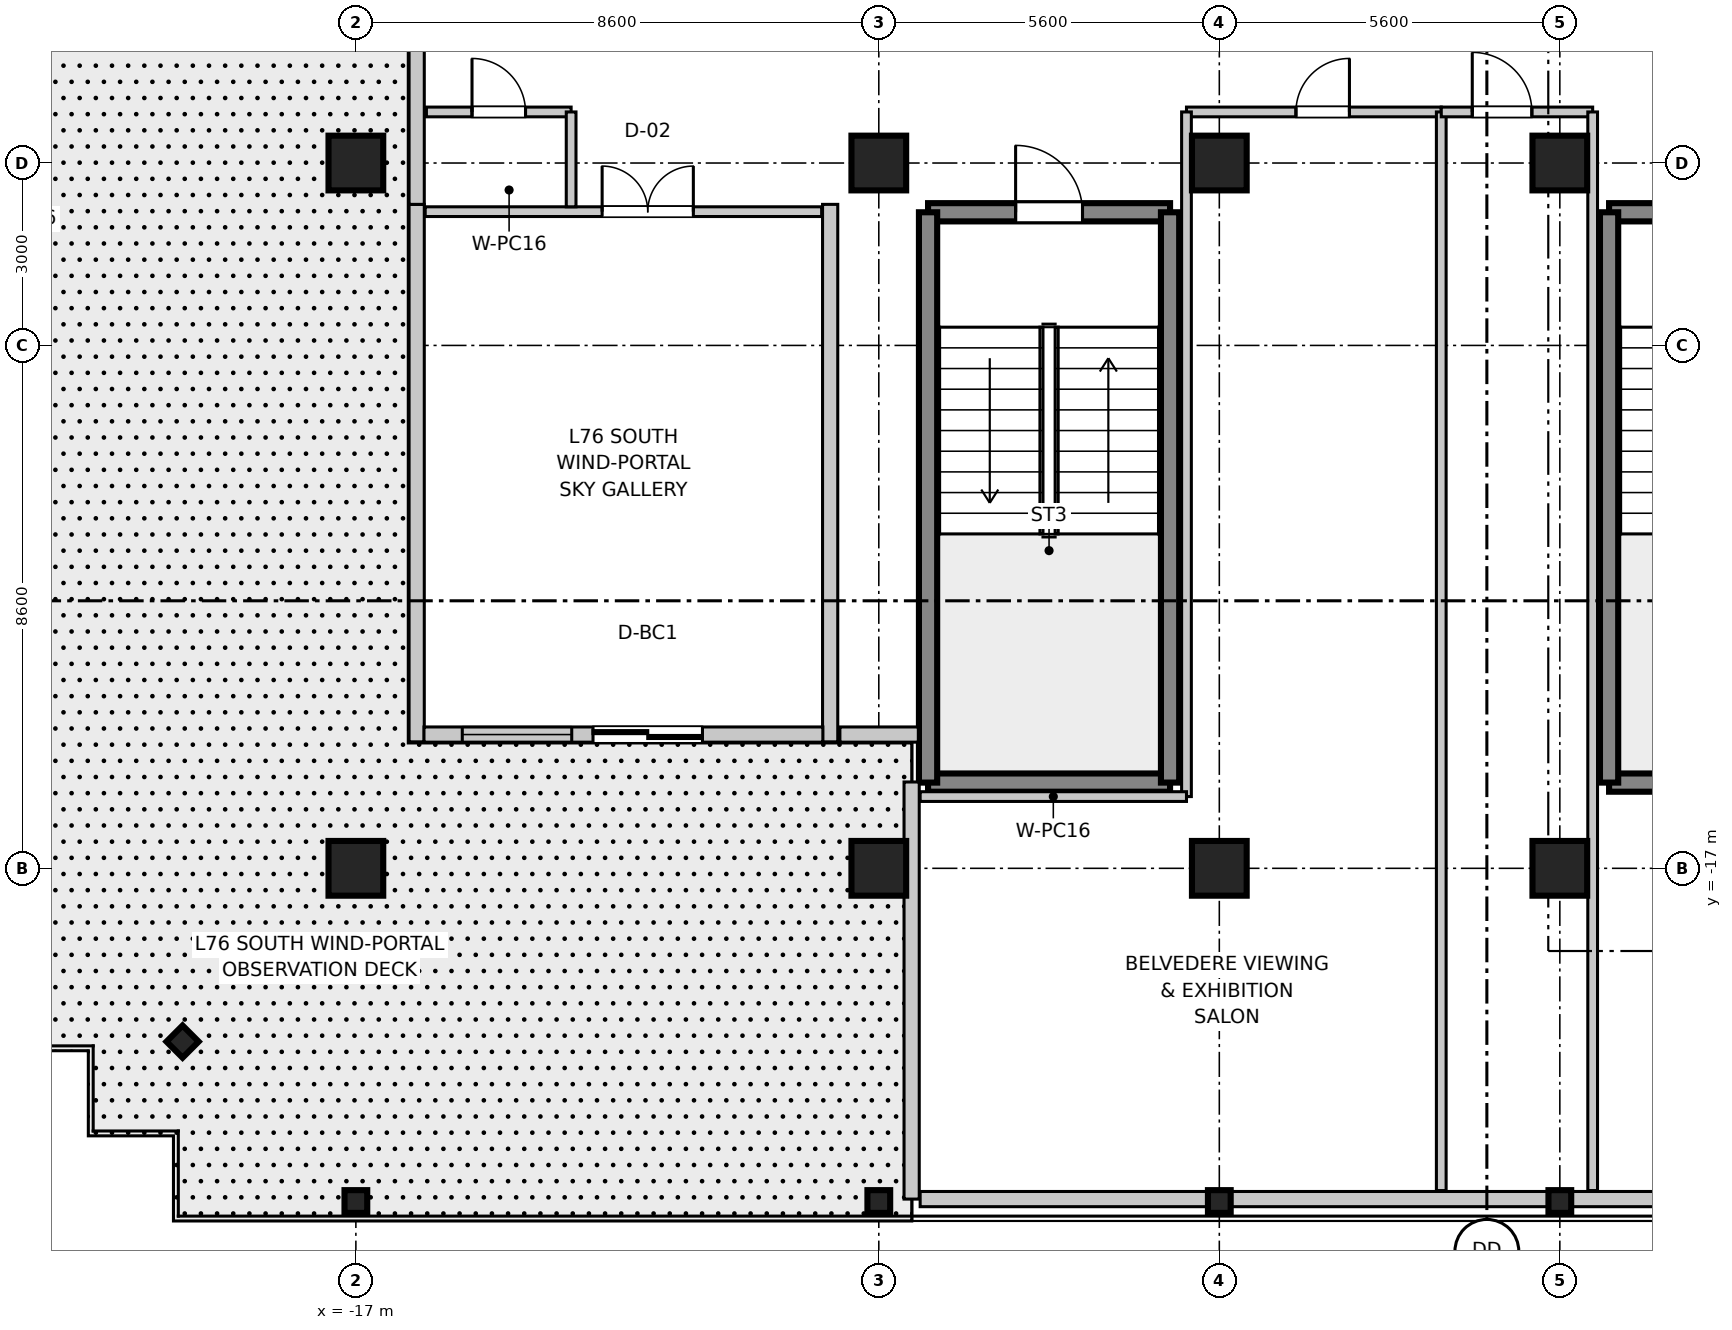
"""IFC4 building model, lengths in metres.
Left out: names, types, materials, properties, quantities, classifications, styles, units other than length and angle.
Written with IfcOpenShell. Run it as: python <this file> out.ifc"""

import sys

from ifc_helpers import new_model, si_unit, direction, frame, frame_2d, origin, origin_2d, place, context, subcontext, project, spatial, rectangle, i_section, extrude, source, transform, mapped, element, fill, save


model = new_model("IFC4")
c1 = context("Model", 3, precision=1e-05, world=origin(), true_north=direction((0.0, 1.0)))
c2 = subcontext(c1, "Body", "Model", "MODEL_VIEW")
j1 = project(units=[si_unit("LENGTHUNIT", "METRE"), si_unit("PLANEANGLEUNIT", "RADIAN")], contexts=[c1])
p1 = place(None, origin())
s1 = spatial("IfcSite", under=j1, at=p1, CompositionType="ELEMENT")
p2 = place(p1, origin())
s2 = spatial("IfcBuilding", under=s1, at=p2, CompositionType="ELEMENT")
p3 = place(p2, frame((0.0, 0.0, 296.5)))
s3 = spatial("IfcBuildingStorey", under=s2, at=p3, CompositionType="ELEMENT", Elevation=296.5)
m1 = source(origin(), c2, "Body", "SweptSolid", [
    extrude(rectangle(XDim=0.9, YDim=0.9, at=origin_2d()), origin(), (0.0, 0.0, 1.0), 3.805),
])
for number, where, z_axis, x_axis in (
    (1, (-17.0, -17.0, 0.0), (0.0, 0.0, 1.0), (1.0, 0.0, 0.0)),
    (2, (-17.0, -5.4, 0.0), (0.0, 0.0, 1.0), (1.0, 0.0, 0.0)),
    (3, (-8.4, -17.0, 0.0), (0.0, 0.0, 1.0), (1.0, 0.0, 0.0)),
    (4, (-8.4, -5.4, 0.0), (0.0, 0.0, 1.0), (1.0, 0.0, 0.0)),
    (5, (-2.8, -17.0, 0.0), (0.0, 0.0, 1.0), (1.0, 0.0, 0.0)),
    (6, (-2.8, -5.4, 0.0), (0.0, 0.0, 1.0), (1.0, 0.0, 0.0)),
    (7, (2.8, -17.0, 0.0), (0.0, 0.0, 1.0), (1.0, 0.0, 0.0)),
    (8, (2.8, -5.4, 0.0), (0.0, 0.0, 1.0), (1.0, 0.0, 0.0)),
):
    element("IfcColumn", number, at=place(p3, frame(where, z_axis=z_axis, x_axis=x_axis)), inside=s3, PredefinedType="COLUMN", context=c2, shape_type="MappedRepresentation", body=[
        mapped(m1, transform((0.0, 0.0, 0.0), scale=1.0)),
    ])
m2 = source(origin(), c2, "Body", "SweptSolid", [
    extrude(i_section(OverallWidth=0.374, OverallDepth=0.374, WebThickness=0.014, FlangeThickness=0.023, at=origin_2d()), origin(), (0.0, 0.0, 1.0), 3.805),
])
for number, where, z_axis, x_axis in (
    (9, (-17.0, -22.48, 0.0), (0.0, 0.0, 1.0), (0.0, 1.0, 0.0)),
    (10, (-8.4, -22.48, 0.0), (0.0, 0.0, 1.0), (0.0, 1.0, 0.0)),
    (11, (-2.8, -22.48, 0.0), (0.0, 0.0, 1.0), (0.0, 1.0, 0.0)),
    (12, (2.8, -22.48, 0.0), (0.0, 0.0, 1.0), (0.0, 1.0, 0.0)),
    (13, (-19.85, -19.85, 0.0), (0.0, 0.0, 1.0), (0.707, 0.707, 0.0)),
):
    element("IfcColumn", number, at=place(p3, frame(where, z_axis=z_axis, x_axis=x_axis)), inside=s3, PredefinedType="COLUMN", context=c2, shape_type="MappedRepresentation", body=[
        mapped(m2, transform((0.0, 0.0, 0.0), scale=1.0)),
    ])
m3 = source(origin(), c2, "Body", "SweptSolid", [
    extrude(rectangle(XDim=3.98, YDim=0.3, at=frame_2d((1.99, 0.0))), origin(), (0.0, 0.0, 1.0), 3.55),
])
p4 = place(p3, frame((3.61, -15.59, 0.0), z_axis=(0.0, 0.0, 1.0), x_axis=(1.0, 0.0, 0.0)))
e14 = element("IfcWall", 14, at=p4, inside=s3, PredefinedType="SHEAR", context=c2, shape_type="MappedRepresentation", body=[
    mapped(m3, transform((0.0, 0.0, 0.0), scale=1.0)),
])
p5 = place(p3, frame((3.61, -6.21, 0.0), z_axis=(0.0, 0.0, 1.0), x_axis=(1.0, 0.0, 0.0)))
e15 = element("IfcWall", 15, at=p5, inside=s3, PredefinedType="SHEAR", context=c2, shape_type="MappedRepresentation", body=[
    mapped(m3, transform((0.0, 0.0, 0.0), scale=1.0)),
])
p6 = place(p5, frame((1.44, 0.0, 0.0)))
e16 = element("IfcOpeningElement", 16, at=p6, cuts=e15, PredefinedType="OPENING", context=c2, shape_type="SweptSolid", body=[
    extrude(rectangle(XDim=1.1, YDim=2.15, at=frame_2d((0.55, 1.075))), frame((0.0, 0.16, 0.0), z_axis=(0.0, -1.0, 0.0), x_axis=(1.0, 0.0, 0.0)), (0.0, 0.0, 1.0), 0.32),
])
m4 = source(origin(), c2, "Body", "SweptSolid", [
    extrude(rectangle(XDim=9.38, YDim=0.3, at=frame_2d((4.69, 0.0))), origin(), (0.0, 0.0, 1.0), 3.55),
])
p7 = place(p3, frame((3.61, -15.59, 0.0), z_axis=(0.0, 0.0, 1.0), x_axis=(0.0, 1.0, 0.0)))
e17 = element("IfcWall", 17, at=p7, inside=s3, PredefinedType="SHEAR", context=c2, shape_type="MappedRepresentation", body=[
    mapped(m4, transform((0.0, 0.0, 0.0), scale=1.0)),
])
p8 = place(p3, frame((-7.59, -15.59, 0.0), z_axis=(0.0, 0.0, 1.0), x_axis=(1.0, 0.0, 0.0)))
e18 = element("IfcWall", 18, at=p8, inside=s3, PredefinedType="SHEAR", context=c2, shape_type="MappedRepresentation", body=[
    mapped(m3, transform((0.0, 0.0, 0.0), scale=1.0)),
])
p9 = place(p3, frame((-7.59, -6.21, 0.0), z_axis=(0.0, 0.0, 1.0), x_axis=(1.0, 0.0, 0.0)))
e19 = element("IfcWall", 19, at=p9, inside=s3, PredefinedType="SHEAR", context=c2, shape_type="MappedRepresentation", body=[
    mapped(m3, transform((0.0, 0.0, 0.0), scale=1.0)),
])
p10 = place(p9, frame((1.44, 0.0, 0.0)))
e20 = element("IfcOpeningElement", 20, at=p10, cuts=e19, PredefinedType="OPENING", context=c2, shape_type="SweptSolid", body=[
    extrude(rectangle(XDim=1.1, YDim=2.15, at=frame_2d((0.55, 1.075))), frame((0.0, 0.16, 0.0), z_axis=(0.0, -1.0, 0.0), x_axis=(1.0, 0.0, 0.0)), (0.0, 0.0, 1.0), 0.32),
])
for number, where, z_axis, x_axis in (
    (21, (-7.59, -15.59, 0.0), (0.0, 0.0, 1.0), (0.0, 1.0, 0.0)),
    (22, (-3.61, -15.59, 0.0), (0.0, 0.0, 1.0), (0.0, 1.0, 0.0)),
):
    element("IfcWall", number, at=place(p3, frame(where, z_axis=z_axis, x_axis=x_axis)), inside=s3, PredefinedType="SHEAR", context=c2, shape_type="MappedRepresentation", body=[
        mapped(m4, transform((0.0, 0.0, 0.0), scale=1.0)),
    ])
m5 = source(origin(), c2, "Body", "SweptSolid", [
    extrude(rectangle(XDim=8.84, YDim=0.25, at=frame_2d((4.42, 0.0))), origin(), (0.0, 0.0, 1.0), 2.99),
])
for number, where, z_axis, x_axis in (
    (23, (-16.0, -14.92, 0.0), (0.0, 0.0, 1.0), (0.0, 1.0, 0.0)),
    (24, (-9.2, -14.92, 0.0), (0.0, 0.0, 1.0), (0.0, 1.0, 0.0)),
):
    element("IfcWall", number, at=place(p3, frame(where, z_axis=z_axis, x_axis=x_axis)), inside=s3, PredefinedType="STANDARD", context=c2, shape_type="MappedRepresentation", body=[
        mapped(m5, transform((0.0, 0.0, 0.0), scale=1.0)),
    ])
m6 = source(origin(), c2, "Body", "SweptSolid", [
    extrude(rectangle(XDim=6.56, YDim=0.25, at=frame_2d((3.28, 0.0))), origin(), (0.0, 0.0, 1.0), 2.99),
])
p11 = place(p3, frame((-15.88, -14.8, 0.0), z_axis=(0.0, 0.0, 1.0), x_axis=(1.0, 0.0, 0.0)))
e25 = element("IfcWall", 25, at=p11, inside=s3, PredefinedType="STANDARD", context=c2, shape_type="MappedRepresentation", body=[
    mapped(m6, transform((0.0, 0.0, 0.0), scale=1.0)),
])
p12 = place(p11, frame((2.78, 0.0, 0.0)))
e26 = element("IfcOpeningElement", 26, at=p12, cuts=e25, PredefinedType="OPENING", context=c2, shape_type="SweptSolid", body=[
    extrude(rectangle(XDim=1.8, YDim=2.25, at=frame_2d((0.9, 1.125))), frame((0.0, 0.135, 0.0), z_axis=(0.0, -1.0, 0.0), x_axis=(1.0, 0.0, 0.0)), (0.0, 0.0, 1.0), 0.27),
])
p13 = place(p11, frame((0.63, 0.0, 0.85)))
e27 = element("IfcOpeningElement", 27, at=p13, cuts=e25, PredefinedType="OPENING", context=c2, shape_type="SweptSolid", body=[
    extrude(rectangle(XDim=1.8, YDim=1.5, at=frame_2d((0.9, 0.75))), frame((0.0, 0.135, 0.0), z_axis=(0.0, -1.0, 0.0), x_axis=(1.0, 0.0, 0.0)), (0.0, 0.0, 1.0), 0.27),
])
m7 = source(origin(), c2, "Body", "SweptSolid", [
    extrude(rectangle(XDim=2.72, YDim=0.25, at=frame_2d((1.36, 0.0))), origin(), (0.0, 0.0, 1.0), 2.89),
])
p14 = place(p3, frame((-16.0, -6.08, 0.0), z_axis=(0.0, 0.0, 1.0), x_axis=(0.0, 1.0, 0.0)))
e28 = element("IfcWall", 28, at=p14, inside=s3, PredefinedType="STANDARD", context=c2, shape_type="MappedRepresentation", body=[
    mapped(m7, transform((0.0, 0.0, 0.0), scale=1.0)),
])
m8 = source(origin(), c2, "Body", "SweptSolid", [
    extrude(rectangle(XDim=1.29, YDim=0.25, at=frame_2d((0.645, 0.0))), origin(), (0.0, 0.0, 1.0), 2.89),
])
p15 = place(p3, frame((-9.04, -14.8, 0.0), z_axis=(0.0, 0.0, 1.0), x_axis=(1.0, 0.0, 0.0)))
e29 = element("IfcWall", 29, at=p15, inside=s3, PredefinedType="STANDARD", context=c2, shape_type="MappedRepresentation", body=[
    mapped(m8, transform((0.0, 0.0, 0.0), scale=1.0)),
])
m9 = source(origin(), c2, "Body", "SweptSolid", [
    extrude(rectangle(XDim=6.86, YDim=0.25, at=frame_2d((3.43, 0.0))), origin(), (0.0, 0.0, 1.0), 2.89),
])
p16 = place(p3, frame((-7.86, -22.44, 0.0), z_axis=(0.0, 0.0, 1.0), x_axis=(0.0, 1.0, 0.0)))
e30 = element("IfcWall", 30, at=p16, inside=s3, PredefinedType="STANDARD", context=c2, shape_type="MappedRepresentation", body=[
    mapped(m9, transform((0.0, 0.0, 0.0), scale=1.0)),
])
m10 = source(origin(), c2, "Body", "SweptSolid", [
    extrude(rectangle(XDim=27.34, YDim=0.25, at=frame_2d((13.67, 0.0))), origin(), (0.0, 0.0, 1.0), 2.89),
])
p17 = place(p3, frame((-7.72, -22.44, 0.0), z_axis=(0.0, 0.0, 1.0), x_axis=(1.0, 0.0, 0.0)))
e31 = element("IfcWall", 31, at=p17, inside=s3, PredefinedType="STANDARD", context=c2, shape_type="MappedRepresentation", body=[
    mapped(m10, transform((0.0, 0.0, 0.0), scale=1.0)),
])
m11 = source(origin(), c2, "Body", "SweptSolid", [
    extrude(rectangle(XDim=6.52, YDim=0.16, at=frame_2d((3.26, 0.0))), origin(), (0.0, 0.0, 1.0), 2.89),
])
p18 = place(p3, frame((-15.86, -6.2, 0.0), z_axis=(0.0, 0.0, 1.0), x_axis=(1.0, 0.0, 0.0)))
e32 = element("IfcWall", 32, at=p18, inside=s3, PredefinedType="PARTITIONING", context=c2, shape_type="MappedRepresentation", body=[
    mapped(m11, transform((0.0, 0.0, 0.0), scale=1.0)),
])
p19 = place(p18, frame((2.91, 0.0, 0.0)))
e33 = element("IfcOpeningElement", 33, at=p19, cuts=e32, PredefinedType="OPENING", context=c2, shape_type="SweptSolid", body=[
    extrude(rectangle(XDim=1.5, YDim=2.15, at=frame_2d((0.75, 1.075))), frame((0.0, 0.09, 0.0), z_axis=(0.0, -1.0, 0.0), x_axis=(1.0, 0.0, 0.0)), (0.0, 0.0, 1.0), 0.18),
])
m12 = source(origin(), c2, "Body", "SweptSolid", [
    extrude(rectangle(XDim=2.38, YDim=0.16, at=frame_2d((1.19, 0.0))), origin(), (0.0, 0.0, 1.0), 2.89),
])
p20 = place(p3, frame((-15.84, -4.56, 0.0), z_axis=(0.0, 0.0, 1.0), x_axis=(1.0, 0.0, 0.0)))
e34 = element("IfcWall", 34, at=p20, inside=s3, PredefinedType="PARTITIONING", context=c2, shape_type="MappedRepresentation", body=[
    mapped(m12, transform((0.0, 0.0, 0.0), scale=1.0)),
])
p21 = place(p20, frame((0.75, 0.0, 0.0)))
e35 = element("IfcOpeningElement", 35, at=p21, cuts=e34, PredefinedType="OPENING", context=c2, shape_type="SweptSolid", body=[
    extrude(rectangle(XDim=0.88, YDim=2.1, at=frame_2d((0.44, 1.05))), frame((0.0, 0.09, 0.0), z_axis=(0.0, -1.0, 0.0), x_axis=(1.0, 0.0, 0.0)), (0.0, 0.0, 1.0), 0.18),
])
m13 = source(origin(), c2, "Body", "SweptSolid", [
    extrude(rectangle(XDim=1.56, YDim=0.16, at=frame_2d((0.78, 0.0))), origin(), (0.0, 0.0, 1.0), 2.89),
])
p22 = place(p3, frame((-13.46, -6.12, 0.0), z_axis=(0.0, 0.0, 1.0), x_axis=(0.0, 1.0, 0.0)))
e36 = element("IfcWall", 36, at=p22, inside=s3, PredefinedType="PARTITIONING", context=c2, shape_type="MappedRepresentation", body=[
    mapped(m13, transform((0.0, 0.0, 0.0), scale=1.0)),
])
m14 = source(origin(), c2, "Body", "SweptSolid", [
    extrude(rectangle(XDim=4.19, YDim=0.16, at=frame_2d((2.095, 0.0))), origin(), (0.0, 0.0, 1.0), 2.89),
])
p23 = place(p3, frame((-3.34, -4.56, 0.0), z_axis=(0.0, 0.0, 1.0), x_axis=(1.0, 0.0, 0.0)))
e37 = element("IfcWall", 37, at=p23, inside=s3, PredefinedType="PARTITIONING", context=c2, shape_type="MappedRepresentation", body=[
    mapped(m14, transform((0.0, 0.0, 0.0), scale=1.0)),
])
p24 = place(p23, frame((1.8, 0.0, 0.0)))
e38 = element("IfcOpeningElement", 38, at=p24, cuts=e37, PredefinedType="OPENING", context=c2, shape_type="SweptSolid", body=[
    extrude(rectangle(XDim=0.88, YDim=2.1, at=frame_2d((0.44, 1.05))), frame((0.0, 0.09, 0.0), z_axis=(0.0, -1.0, 0.0), x_axis=(1.0, 0.0, 0.0)), (0.0, 0.0, 1.0), 0.18),
])
m15 = source(origin(), c2, "Body", "SweptSolid", [
    extrude(rectangle(XDim=11.26, YDim=0.16, at=frame_2d((5.63, 0.0))), origin(), (0.0, 0.0, 1.0), 2.89),
])
p25 = place(p3, frame((-3.34, -15.82, 0.0), z_axis=(0.0, 0.0, 1.0), x_axis=(0.0, 1.0, 0.0)))
e39 = element("IfcWall", 39, at=p25, inside=s3, PredefinedType="PARTITIONING", context=c2, shape_type="MappedRepresentation", body=[
    mapped(m15, transform((0.0, 0.0, 0.0), scale=1.0)),
])
m16 = source(origin(), c2, "Body", "SweptSolid", [
    extrude(rectangle(XDim=4.38, YDim=0.16, at=frame_2d((2.19, 0.0))), origin(), (0.0, 0.0, 1.0), 2.89),
])
p26 = place(p3, frame((-7.72, -15.82, 0.0), z_axis=(0.0, 0.0, 1.0), x_axis=(1.0, 0.0, 0.0)))
e40 = element("IfcWall", 40, at=p26, inside=s3, PredefinedType="PARTITIONING", context=c2, shape_type="MappedRepresentation", body=[
    mapped(m16, transform((0.0, 0.0, 0.0), scale=1.0)),
])
m17 = source(origin(), c2, "Body", "SweptSolid", [
    extrude(rectangle(XDim=17.74, YDim=0.16, at=frame_2d((8.87, 0.0))), origin(), (0.0, 0.0, 1.0), 2.89),
])
p27 = place(p3, frame((0.85, -22.3, 0.0), z_axis=(0.0, 0.0, 1.0), x_axis=(0.0, 1.0, 0.0)))
e41 = element("IfcWall", 41, at=p27, inside=s3, PredefinedType="PARTITIONING", context=c2, shape_type="MappedRepresentation", body=[
    mapped(m17, transform((0.0, 0.0, 0.0), scale=1.0)),
])
m18 = source(origin(), c2, "Body", "SweptSolid", [
    extrude(rectangle(XDim=2.49, YDim=0.16, at=frame_2d((1.245, 0.0))), origin(), (0.0, 0.0, 1.0), 2.89),
])
p28 = place(p3, frame((0.85, -4.56, 0.0), z_axis=(0.0, 0.0, 1.0), x_axis=(1.0, 0.0, 0.0)))
e42 = element("IfcWall", 42, at=p28, inside=s3, PredefinedType="PARTITIONING", context=c2, shape_type="MappedRepresentation", body=[
    mapped(m18, transform((0.0, 0.0, 0.0), scale=1.0)),
])
p29 = place(p28, frame((0.51, 0.0, 0.0)))
e43 = element("IfcOpeningElement", 43, at=p29, cuts=e42, PredefinedType="OPENING", context=c2, shape_type="SweptSolid", body=[
    extrude(rectangle(XDim=0.98, YDim=2.1, at=frame_2d((0.49, 1.05))), frame((0.0, 0.09, 0.0), z_axis=(0.0, -1.0, 0.0), x_axis=(1.0, 0.0, 0.0)), (0.0, 0.0, 1.0), 0.18),
])
p30 = place(p3, frame((3.34, -22.3, 0.0), z_axis=(0.0, 0.0, 1.0), x_axis=(0.0, 1.0, 0.0)))
e44 = element("IfcWall", 44, at=p30, inside=s3, PredefinedType="PARTITIONING", context=c2, shape_type="MappedRepresentation", body=[
    mapped(m17, transform((0.0, 0.0, 0.0), scale=1.0)),
])
m19 = source(origin(), c2, "Body", "SweptSolid", [
    extrude(rectangle(XDim=1.1, YDim=2.15, at=frame_2d((0.55, 1.075))), frame((0.0, 0.025, 0.0), z_axis=(0.0, -1.0, 0.0), x_axis=(1.0, 0.0, 0.0)), (0.0, 0.0, 1.0), 0.05),
])
p31 = place(p10, frame((1.1, 0.0, 0.0), z_axis=(0.0, 0.0, 1.0), x_axis=(-1.0, 0.0, 0.0)))
e45 = element("IfcDoor", 45, at=p31, inside=s3, OperationType="SINGLE_SWING_LEFT", PredefinedType="DOOR", context=c2, shape_type="MappedRepresentation", body=[
    mapped(m19, transform((0.0, 0.0, 0.0), scale=1.0)),
])
fill(e20, e45)
m20 = source(origin(), c2, "Body", "SweptSolid", [
    extrude(rectangle(XDim=1.8, YDim=2.25, at=frame_2d((0.9, 1.125))), frame((0.0, 0.025, 0.0), z_axis=(0.0, -1.0, 0.0), x_axis=(1.0, 0.0, 0.0)), (0.0, 0.0, 1.0), 0.05),
])
p32 = place(p12, frame((1.8, 0.0, 0.0), z_axis=(0.0, 0.0, 1.0), x_axis=(-1.0, 0.0, 0.0)))
e46 = element("IfcDoor", 46, at=p32, inside=s3, OperationType="DOUBLE_DOOR_SLIDING", PredefinedType="DOOR", context=c2, shape_type="MappedRepresentation", body=[
    mapped(m20, transform((0.0, 0.0, 0.0), scale=1.0)),
])
fill(e26, e46)
m21 = source(origin(), c2, "Body", "SweptSolid", [
    extrude(rectangle(XDim=1.8, YDim=1.5, at=frame_2d((0.9, 0.75))), frame((0.0, 0.03, 0.0), z_axis=(0.0, -1.0, 0.0), x_axis=(1.0, 0.0, 0.0)), (0.0, 0.0, 1.0), 0.06),
])
p33 = place(p13, origin())
e47 = element("IfcWindow", 47, at=p33, inside=s3, PartitioningType="SINGLE_PANEL", PredefinedType="WINDOW", context=c2, shape_type="MappedRepresentation", body=[
    mapped(m21, transform((0.0, 0.0, 0.0), scale=1.0)),
])
fill(e27, e47)
m22 = source(origin(), c2, "Body", "SweptSolid", [
    extrude(rectangle(XDim=1.5, YDim=2.15, at=frame_2d((0.75, 1.075))), frame((0.0, 0.025, 0.0), z_axis=(0.0, -1.0, 0.0), x_axis=(1.0, 0.0, 0.0)), (0.0, 0.0, 1.0), 0.05),
])
p34 = place(p19, frame((1.5, 0.0, 0.0), z_axis=(0.0, 0.0, 1.0), x_axis=(-1.0, 0.0, 0.0)))
e48 = element("IfcDoor", 48, at=p34, inside=s3, OperationType="DOUBLE_DOOR_SINGLE_SWING", PredefinedType="DOOR", context=c2, shape_type="MappedRepresentation", body=[
    mapped(m22, transform((0.0, 0.0, 0.0), scale=1.0)),
])
fill(e33, e48)
m23 = source(origin(), c2, "Body", "SweptSolid", [
    extrude(rectangle(XDim=0.88, YDim=2.1, at=frame_2d((0.44, 1.05))), frame((0.0, 0.025, 0.0), z_axis=(0.0, -1.0, 0.0), x_axis=(1.0, 0.0, 0.0)), (0.0, 0.0, 1.0), 0.05),
])
p35 = place(p21, frame((0.88, 0.0, 0.0), z_axis=(0.0, 0.0, 1.0), x_axis=(-1.0, 0.0, 0.0)))
e49 = element("IfcDoor", 49, at=p35, inside=s3, OperationType="SINGLE_SWING_LEFT", PredefinedType="DOOR", context=c2, shape_type="MappedRepresentation", body=[
    mapped(m23, transform((0.0, 0.0, 0.0), scale=1.0)),
])
fill(e35, e49)
p36 = place(p24, frame((0.88, 0.0, 0.0), z_axis=(0.0, 0.0, 1.0), x_axis=(-1.0, 0.0, 0.0)))
e50 = element("IfcDoor", 50, at=p36, inside=s3, OperationType="SINGLE_SWING_RIGHT", PredefinedType="DOOR", context=c2, shape_type="MappedRepresentation", body=[
    mapped(m23, transform((0.0, 0.0, 0.0), scale=1.0)),
])
fill(e38, e50)
m24 = source(origin(), c2, "Body", "SweptSolid", [
    extrude(rectangle(XDim=0.98, YDim=2.1, at=frame_2d((0.49, 1.05))), frame((0.0, 0.025, 0.0), z_axis=(0.0, -1.0, 0.0), x_axis=(1.0, 0.0, 0.0)), (0.0, 0.0, 1.0), 0.05),
])
p37 = place(p29, frame((0.98, 0.0, 0.0), z_axis=(0.0, 0.0, 1.0), x_axis=(-1.0, 0.0, 0.0)))
e51 = element("IfcDoor", 51, at=p37, inside=s3, OperationType="SINGLE_SWING_LEFT", PredefinedType="DOOR", context=c2, shape_type="MappedRepresentation", body=[
    mapped(m24, transform((0.0, 0.0, 0.0), scale=1.0)),
])
fill(e43, e51)
save(model, sys.argv[1])
